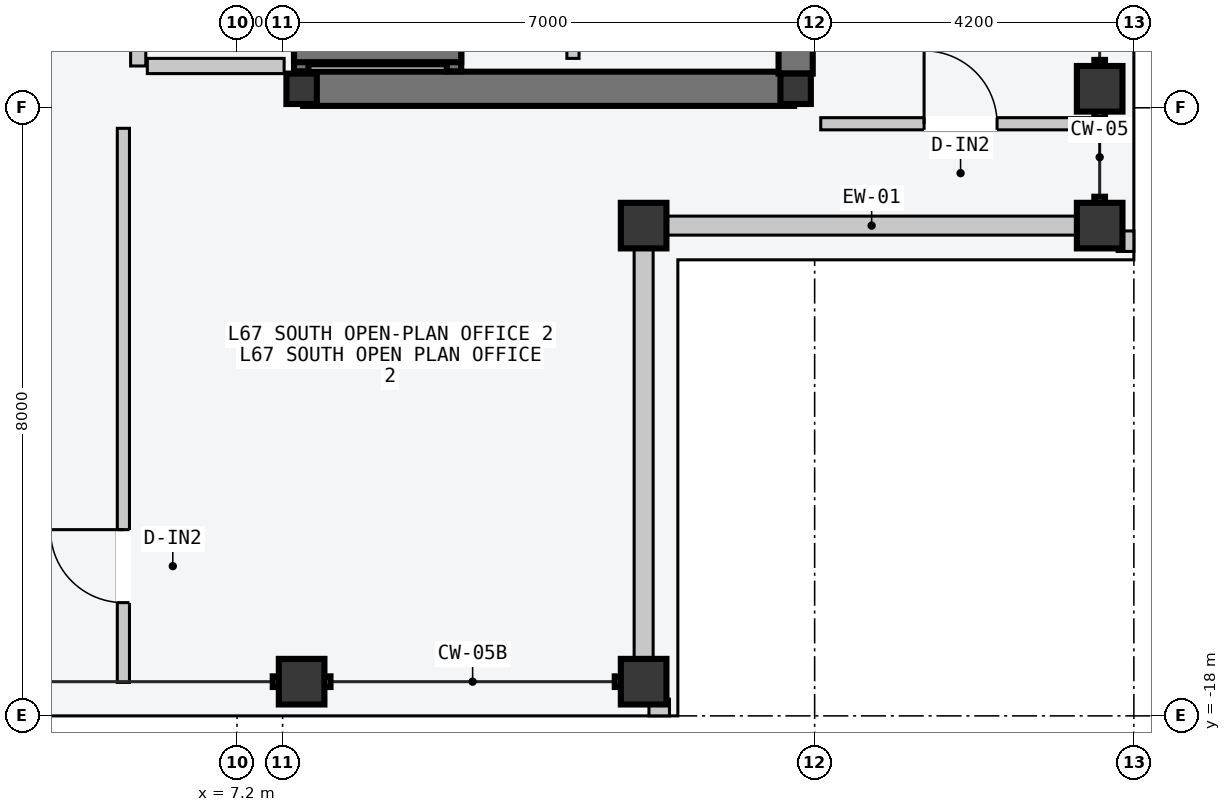
"""IFC4 building model, lengths in metres.
Left out: names, types, materials, properties, quantities, classifications, styles, units other than length and angle.
Written with IfcOpenShell. Run it as: python <this file> out.ifc"""

import sys

from ifc_helpers import new_model, si_unit, direction, frame, frame_2d, origin, origin_2d, place, context, subcontext, project, spatial, rectangle, hollow_rectangle, i_section, extrude, element, fill, save


model = new_model("IFC4")
c1 = context("Model", 3, precision=1e-05, world=origin(), true_north=direction((0.0, 1.0)))
c2 = subcontext(c1, "Body", "Model", "MODEL_VIEW")
j1 = project(units=[si_unit("LENGTHUNIT", "METRE"), si_unit("PLANEANGLEUNIT", "RADIAN")], contexts=[c1])
p1 = place(None, origin())
s1 = spatial("IfcSite", under=j1, at=p1, CompositionType="ELEMENT")
p2 = place(p1, origin())
s2 = spatial("IfcBuilding", under=s1, at=p2, CompositionType="ELEMENT")
p3 = place(p2, frame((0.0, 0.0, 254.4)))
s3 = spatial("IfcBuildingStorey", under=s2, at=p3, CompositionType="ELEMENT", Elevation=254.4)
p4 = place(p3, frame((8.07, -9.75, -0.2), z_axis=(0.0, 0.0, 1.0), x_axis=(1.0, 0.0, 0.0)))
e1 = element("IfcWall", 1, at=p4, inside=s3, PredefinedType="SHEAR", context=c2, shape_type="SweptSolid", body=[
    extrude(rectangle(XDim=6.46, YDim=0.45, at=frame_2d((3.23, 0.0))), origin(), (0.0, 0.0, 1.0), 3.6),
])
p5 = place(p3, frame((14.55, -9.55, -0.2), z_axis=(0.0, 0.0, 1.0), x_axis=(0.0, 1.0, 0.0)))
e2 = element("IfcWall", 2, at=p5, inside=s3, PredefinedType="SHEAR", context=c2, shape_type="SweptSolid", body=[
    extrude(rectangle(XDim=9.35, YDim=0.45, at=frame_2d((4.675, 0.0))), origin(), (0.0, 0.0, 1.0), 3.6),
])
for number, where, z_axis, x_axis in (
    (3, (8.05, -9.75, 0.0), (0.0, 0.0, 1.0), (1.0, 0.0, 0.0)),
    (4, (14.55, -9.75, 0.0), (0.0, 0.0, 1.0), (1.0, 0.0, 0.0)),
):
    element("IfcColumn", number, at=place(p3, frame(where, z_axis=z_axis, x_axis=x_axis)), inside=s3, PredefinedType="COLUMN", context=c2, shape_type="SweptSolid", body=[
        extrude(i_section(OverallWidth=0.4, OverallDepth=0.4, WebThickness=0.013, FlangeThickness=0.021, at=origin_2d()), origin(), (0.0, 0.0, 1.0), 3.6),
    ])
for number, where, z_axis, x_axis in (
    (5, (8.05, -17.55, 0.0), (0.0, 0.0, 1.0), (1.0, 0.0, 0.0)),
    (6, (12.55, -17.55, 0.0), (0.0, 0.0, 1.0), (1.0, 0.0, 0.0)),
    (7, (18.55, -11.55, 0.0), (0.0, 0.0, 1.0), (0.0, 1.0, 0.0)),
    (8, (18.55, -9.75, 0.0), (0.0, 0.0, 1.0), (0.0, 1.0, 0.0)),
    (9, (12.55, -11.55, 0.0), (0.0, 0.0, 1.0), (1.0, 0.0, 0.0)),
):
    element("IfcColumn", number, at=place(p3, frame(where, z_axis=z_axis, x_axis=x_axis)), inside=s3, PredefinedType="COLUMN", context=c2, shape_type="SweptSolid", body=[
        extrude(hollow_rectangle(XDim=0.6, YDim=0.6, WallThickness=0.025, at=origin_2d()), origin(), (0.0, 0.0, 1.0), 3.6),
    ])
for number, where, z_axis, x_axis in (
    (10, (12.86, -11.55, 0.0), (0.0, 0.0, 1.0), (1.0, 0.0, 0.0)),
    (11, (12.55, -17.24, 0.0), (0.0, 0.0, 1.0), (0.0, 1.0, 0.0)),
):
    element("IfcWall", number, at=place(p3, frame(where, z_axis=z_axis, x_axis=x_axis)), inside=s3, PredefinedType="STANDARD", context=c2, shape_type="SweptSolid", body=[
        extrude(rectangle(XDim=5.38, YDim=0.25, at=frame_2d((2.69, 0.0))), origin(), (0.0, 0.0, 1.0), 2.85),
    ])
for number, where, z_axis, x_axis in (
    (12, (12.62, -17.89, 0.0), (0.0, 0.0, 1.0), (1.0, 0.0, 0.0)),
    (13, (18.89, -11.89, 0.0), (0.0, 0.0, 1.0), (0.0, 1.0, 0.0)),
):
    element("IfcWall", number, at=place(p3, frame(where, z_axis=z_axis, x_axis=x_axis)), inside=s3, PredefinedType="PARAPET", context=c2, shape_type="SweptSolid", body=[
        extrude(rectangle(XDim=0.27, YDim=0.22, at=frame_2d((0.135, 0.0))), origin(), (0.0, 0.0, 1.0), 1.2),
    ])
p6 = place(p3, frame((8.045, -9.52, -0.2), z_axis=(0.0, 0.0, 1.0), x_axis=(0.0, 1.0, 0.0)))
e14 = element("IfcWall", 14, at=p6, inside=s3, PredefinedType="SOLIDWALL", context=c2, shape_type="SweptSolid", body=[
    extrude(rectangle(XDim=2.12, YDim=0.19, at=frame_2d((1.06, 0.0))), origin(), (0.0, 0.0, 1.0), 3.6),
])
p7 = place(p6, frame((0.57, 0.0, 0.2)))
e15 = element("IfcOpeningElement", 15, at=p7, cuts=e14, PredefinedType="OPENING", context=c2, shape_type="SweptSolid", body=[
    extrude(rectangle(XDim=1.1, YDim=2.2, at=frame_2d((0.55, 1.1))), frame((0.0, 0.105, 0.0), z_axis=(0.0, -1.0, 0.0), x_axis=(1.0, 0.0, 0.0)), (0.0, 0.0, 1.0), 0.21),
])
p8 = place(p3, frame((10.055, -9.52, -0.2), z_axis=(0.0, 0.0, 1.0), x_axis=(0.0, 1.0, 0.0)))
e16 = element("IfcWall", 16, at=p8, inside=s3, PredefinedType="SOLIDWALL", context=c2, shape_type="SweptSolid", body=[
    extrude(rectangle(XDim=2.12, YDim=0.19, at=frame_2d((1.06, 0.0))), origin(), (0.0, 0.0, 1.0), 3.6),
])
p9 = place(p3, frame((7.95, -9.305, -0.2), z_axis=(0.0, 0.0, 1.0), x_axis=(1.0, 0.0, 0.0)))
e17 = element("IfcWall", 17, at=p9, inside=s3, PredefinedType="SOLIDWALL", context=c2, shape_type="SweptSolid", body=[
    extrude(rectangle(XDim=2.2, YDim=0.19, at=frame_2d((1.1, 0.0))), origin(), (0.0, 0.0, 1.0), 3.6),
])
p10 = place(p3, frame((5.9, -9.45, 0.0), z_axis=(0.0, 0.0, 1.0), x_axis=(0.0, 1.0, 0.0)))
e18 = element("IfcWall", 18, at=p10, inside=s3, PredefinedType="PARTITIONING", context=c2, shape_type="SweptSolid", body=[
    extrude(rectangle(XDim=10.5, YDim=0.2, at=frame_2d((5.25, 0.0))), origin(), (0.0, 0.0, 1.0), 3.4),
])
p11 = place(p10, frame((3.9, 0.0, 0.0)))
e19 = element("IfcOpeningElement", 19, at=p11, cuts=e18, PredefinedType="OPENING", context=c2, shape_type="SweptSolid", body=[
    extrude(rectangle(XDim=1.5, YDim=2.2, at=frame_2d((0.75, 1.1))), frame((0.0, 0.11, 0.0), z_axis=(0.0, -1.0, 0.0), x_axis=(1.0, 0.0, 0.0)), (0.0, 0.0, 1.0), 0.22),
])
p12 = place(p3, frame((6.02, -9.45, 0.0), z_axis=(0.0, 0.0, 1.0), x_axis=(1.0, 0.0, 0.0)))
e20 = element("IfcWall", 20, at=p12, inside=s3, PredefinedType="PARTITIONING", context=c2, shape_type="SweptSolid", body=[
    extrude(rectangle(XDim=1.8, YDim=0.2, at=frame_2d((0.9, 0.0))), origin(), (0.0, 0.0, 1.0), 3.4),
])
p13 = place(p3, frame((11.62, -9.35, 0.0), z_axis=(0.0, 0.0, 1.0), x_axis=(0.0, 1.0, 0.0)))
e21 = element("IfcWall", 21, at=p13, inside=s3, PredefinedType="PARTITIONING", context=c2, shape_type="SweptSolid", body=[
    extrude(rectangle(XDim=3.85, YDim=0.16, at=frame_2d((1.925, 0.0))), origin(), (0.0, 0.0, 1.0), 3.4),
])
p14 = place(p13, frame((0.512, 0.0, 0.0)))
e22 = element("IfcOpeningElement", 22, at=p14, cuts=e21, PredefinedType="OPENING", context=c2, shape_type="SweptSolid", body=[
    extrude(rectangle(XDim=0.9, YDim=2.15, at=frame_2d((0.45, 1.075))), frame((0.0, 0.09, 0.0), z_axis=(0.0, -1.0, 0.0), x_axis=(1.0, 0.0, 0.0)), (0.0, 0.0, 1.0), 0.18),
])
p15 = place(p13, frame((2.438, 0.0, 0.0)))
e23 = element("IfcOpeningElement", 23, at=p15, cuts=e21, PredefinedType="OPENING", context=c2, shape_type="SweptSolid", body=[
    extrude(rectangle(XDim=0.9, YDim=2.15, at=frame_2d((0.45, 1.075))), frame((0.0, 0.09, 0.0), z_axis=(0.0, -1.0, 0.0), x_axis=(1.0, 0.0, 0.0)), (0.0, 0.0, 1.0), 0.18),
])
p16 = place(p3, frame((5.705, -17.56, 0.0), z_axis=(0.0, 0.0, 1.0), x_axis=(0.0, 1.0, 0.0)))
e24 = element("IfcWall", 24, at=p16, inside=s3, PredefinedType="PARTITIONING", context=c2, shape_type="SweptSolid", body=[
    extrude(rectangle(XDim=7.29, YDim=0.16, at=frame_2d((3.645, 0.0))), origin(), (0.0, 0.0, 1.0), 3.4),
])
p17 = place(p16, frame((1.05, 0.0, 0.0)))
e25 = element("IfcOpeningElement", 25, at=p17, cuts=e24, PredefinedType="OPENING", context=c2, shape_type="SweptSolid", body=[
    extrude(rectangle(XDim=0.96, YDim=2.18, at=frame_2d((0.48, 1.09))), frame((0.0, 0.09, 0.0), z_axis=(0.0, -1.0, 0.0), x_axis=(1.0, 0.0, 0.0)), (0.0, 0.0, 1.0), 0.18),
])
p18 = place(p3, frame((14.88, -10.21, 0.0), z_axis=(0.0, 0.0, 1.0), x_axis=(1.0, 0.0, 0.0)))
e26 = element("IfcWall", 26, at=p18, inside=s3, PredefinedType="PARTITIONING", context=c2, shape_type="SweptSolid", body=[
    extrude(rectangle(XDim=3.68, YDim=0.16, at=frame_2d((1.84, 0.0))), origin(), (0.0, 0.0, 1.0), 3.4),
])
p19 = place(p18, frame((1.36, 0.0, 0.0)))
e27 = element("IfcOpeningElement", 27, at=p19, cuts=e26, PredefinedType="OPENING", context=c2, shape_type="SweptSolid", body=[
    extrude(rectangle(XDim=0.96, YDim=2.18, at=frame_2d((0.48, 1.09))), frame((0.0, 0.09, 0.0), z_axis=(0.0, -1.0, 0.0), x_axis=(1.0, 0.0, 0.0)), (0.0, 0.0, 1.0), 0.18),
])
p20 = place(p17, origin())
e28 = element("IfcDoor", 28, at=p20, inside=s3, OperationType="SINGLE_SWING_RIGHT", PredefinedType="DOOR", context=c2, shape_type="SweptSolid", body=[
    extrude(rectangle(XDim=0.96, YDim=2.18, at=frame_2d((0.48, 1.09))), frame((0.0, 0.025, 0.0), z_axis=(0.0, -1.0, 0.0), x_axis=(1.0, 0.0, 0.0)), (0.0, 0.0, 1.0), 0.05),
])
fill(e25, e28)
p21 = place(p19, origin())
e29 = element("IfcDoor", 29, at=p21, inside=s3, OperationType="SINGLE_SWING_LEFT", PredefinedType="DOOR", context=c2, shape_type="SweptSolid", body=[
    extrude(rectangle(XDim=0.96, YDim=2.18, at=frame_2d((0.48, 1.09))), frame((0.0, 0.025, 0.0), z_axis=(0.0, -1.0, 0.0), x_axis=(1.0, 0.0, 0.0)), (0.0, 0.0, 1.0), 0.05),
])
fill(e27, e29)
save(model, sys.argv[1])
